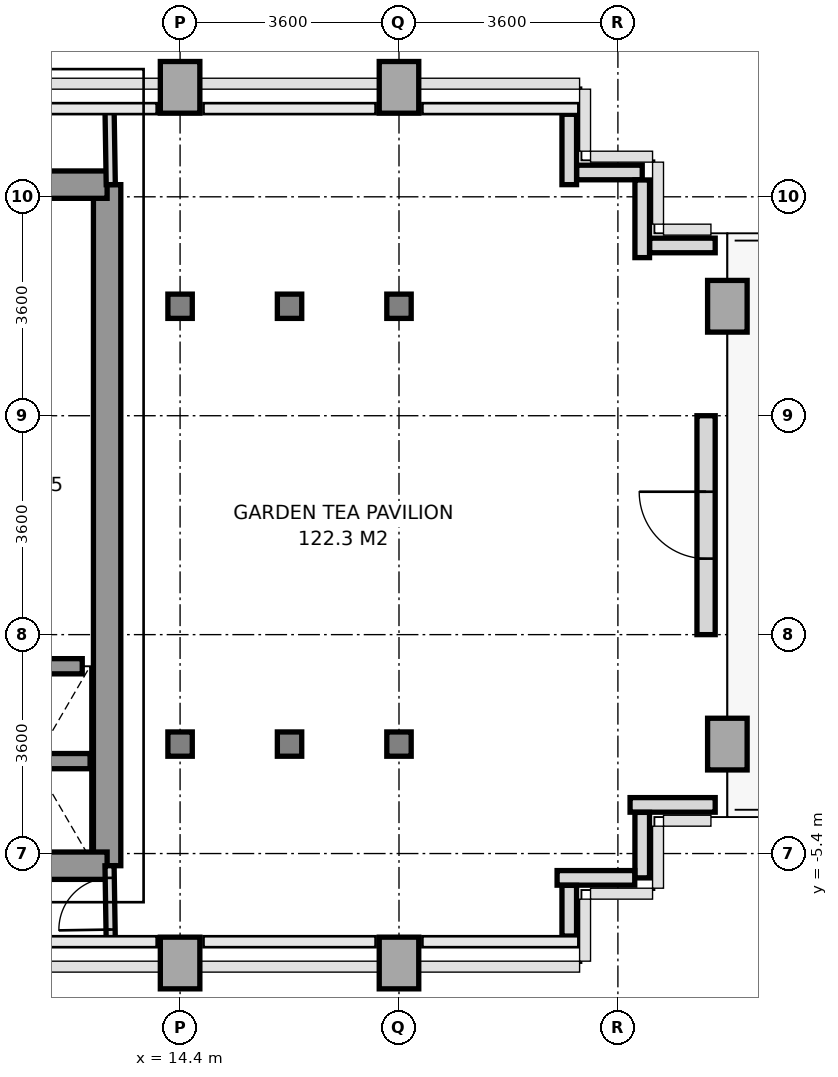
"""IFC4 building model, lengths in metres.
Left out: names, types, materials, properties, quantities, classifications, styles, units other than length and angle.
Written with IfcOpenShell. Run it as: python <this file> out.ifc"""

import sys

from ifc_helpers import new_model, si_unit, direction, frame, frame_2d, origin, origin_2d, place, context, subcontext, project, spatial, rectangle, i_section, extrude, source, transform, mapped, element, fill, save


model = new_model("IFC4")
c1 = context("Model", 3, precision=1e-05, world=origin(), true_north=direction((0.0, 1.0)))
c2 = subcontext(c1, "Body", "Model", "MODEL_VIEW")
j1 = project(units=[si_unit("LENGTHUNIT", "METRE"), si_unit("PLANEANGLEUNIT", "RADIAN")], contexts=[c1])
p1 = place(None, origin())
s1 = spatial("IfcSite", under=j1, at=p1, CompositionType="ELEMENT")
p2 = place(p1, origin())
s2 = spatial("IfcBuilding", under=s1, at=p2, CompositionType="ELEMENT")
p3 = place(p2, frame((0.0, 0.0, 93.0)))
s3 = spatial("IfcBuildingStorey", under=s2, at=p3, CompositionType="ELEMENT", Elevation=93.0)
m1 = source(origin(), c2, "Body", "SweptSolid", [
    extrude(rectangle(XDim=0.65, YDim=0.85, at=origin_2d()), origin(), (0.0, 0.0, 1.0), 4.0),
])
p4 = place(p3, frame((14.4, -7.2, 0.0), z_axis=(0.0, 0.0, 1.0), x_axis=(1.0, 0.0, 0.0)))
e1 = element("IfcColumn", 1, at=p4, inside=s3, PredefinedType="COLUMN", context=c2, shape_type="MappedRepresentation", body=[
    mapped(m1, transform((0.0, 0.0, 0.0), x_axis=(1.0, 0.0, 0.0), y_axis=(0.0, 1.0, 0.0), z_axis=(0.0, 0.0, 1.0), scale=1.0)),
])
m2 = source(origin(), c2, "Body", "SweptSolid", [
    extrude(i_section(OverallWidth=0.401, OverallDepth=0.399, WebThickness=0.02, FlangeThickness=0.032, at=origin_2d()), origin(), (0.0, 0.0, 1.0), 4.0),
])
for number, where, z_axis, x_axis in (
    (2, (14.4, -3.6, 0.0), (0.0, 0.0, 1.0), (1.0, 0.0, 0.0)),
    (3, (14.4, 3.6, 0.0), (0.0, 0.0, 1.0), (1.0, 0.0, 0.0)),
):
    element("IfcColumn", number, at=place(p3, frame(where, z_axis=z_axis, x_axis=x_axis)), inside=s3, PredefinedType="COLUMN", context=c2, shape_type="MappedRepresentation", body=[
        mapped(m2, transform((0.0, 0.0, 0.0), x_axis=(1.0, 0.0, 0.0), y_axis=(0.0, 1.0, 0.0), z_axis=(0.0, 0.0, 1.0), scale=1.0)),
    ])
p5 = place(p3, frame((14.4, 7.2, 0.0), z_axis=(0.0, 0.0, 1.0), x_axis=(1.0, 0.0, 0.0)))
e4 = element("IfcColumn", 4, at=p5, inside=s3, PredefinedType="COLUMN", context=c2, shape_type="MappedRepresentation", body=[
    mapped(m1, transform((0.0, 0.0, 0.0), x_axis=(1.0, 0.0, 0.0), y_axis=(0.0, 1.0, 0.0), z_axis=(0.0, 0.0, 1.0), scale=1.0)),
])
for number, where, z_axis, x_axis in (
    (5, (16.2, -3.6, 0.0), (0.0, 0.0, 1.0), (1.0, 0.0, 0.0)),
    (6, (16.2, 3.6, 0.0), (0.0, 0.0, 1.0), (1.0, 0.0, 0.0)),
):
    element("IfcColumn", number, at=place(p3, frame(where, z_axis=z_axis, x_axis=x_axis)), inside=s3, PredefinedType="COLUMN", context=c2, shape_type="MappedRepresentation", body=[
        mapped(m2, transform((0.0, 0.0, 0.0), x_axis=(1.0, 0.0, 0.0), y_axis=(0.0, 1.0, 0.0), z_axis=(0.0, 0.0, 1.0), scale=1.0)),
    ])
p6 = place(p3, frame((18.0, -7.2, 0.0), z_axis=(0.0, 0.0, 1.0), x_axis=(1.0, 0.0, 0.0)))
e7 = element("IfcColumn", 7, at=p6, inside=s3, PredefinedType="COLUMN", context=c2, shape_type="MappedRepresentation", body=[
    mapped(m1, transform((0.0, 0.0, 0.0), x_axis=(1.0, 0.0, 0.0), y_axis=(0.0, 1.0, 0.0), z_axis=(0.0, 0.0, 1.0), scale=1.0)),
])
for number, where, z_axis, x_axis in (
    (8, (18.0, -3.6, 0.0), (0.0, 0.0, 1.0), (1.0, 0.0, 0.0)),
    (9, (18.0, 3.6, 0.0), (0.0, 0.0, 1.0), (1.0, 0.0, 0.0)),
):
    element("IfcColumn", number, at=place(p3, frame(where, z_axis=z_axis, x_axis=x_axis)), inside=s3, PredefinedType="COLUMN", context=c2, shape_type="MappedRepresentation", body=[
        mapped(m2, transform((0.0, 0.0, 0.0), x_axis=(1.0, 0.0, 0.0), y_axis=(0.0, 1.0, 0.0), z_axis=(0.0, 0.0, 1.0), scale=1.0)),
    ])
for number, where, z_axis, x_axis in (
    (10, (18.0, 7.2, 0.0), (0.0, 0.0, 1.0), (1.0, 0.0, 0.0)),
    (11, (23.4, -3.6, 0.0), (0.0, 0.0, 1.0), (1.0, 0.0, 0.0)),
    (12, (23.4, 3.6, 0.0), (0.0, 0.0, 1.0), (1.0, 0.0, 0.0)),
):
    element("IfcColumn", number, at=place(p3, frame(where, z_axis=z_axis, x_axis=x_axis)), inside=s3, PredefinedType="COLUMN", context=c2, shape_type="MappedRepresentation", body=[
        mapped(m1, transform((0.0, 0.0, 0.0), x_axis=(1.0, 0.0, 0.0), y_axis=(0.0, 1.0, 0.0), z_axis=(0.0, 0.0, 1.0), scale=1.0)),
    ])
p7 = place(p3, frame((23.05, -1.8, 0.0), z_axis=(0.0, 0.0, 1.0), x_axis=(0.0, 1.0, 0.0)))
e13 = element("IfcWall", 13, at=p7, inside=s3, PredefinedType="SOLIDWALL", context=c2, shape_type="SweptSolid", body=[
    extrude(rectangle(XDim=3.6, YDim=0.3, at=frame_2d((1.8, 0.0))), origin(), (0.0, 0.0, 1.0), 3.25),
])
p8 = place(p7, frame((1.25, 0.0, 0.0)))
e14 = element("IfcOpeningElement", 14, at=p8, cuts=e13, PredefinedType="OPENING", context=c2, shape_type="SweptSolid", body=[
    extrude(rectangle(XDim=1.1, YDim=2.3, at=frame_2d((0.55, 1.15))), frame((0.0, 0.16, 0.0), z_axis=(0.0, -1.0, 0.0), x_axis=(1.0, 0.0, 0.0)), (0.0, 0.0, 1.0), 0.32),
])
p9 = place(p3, frame((23.2, -4.6, 0.0), z_axis=(0.0, 0.0, 1.0), x_axis=(-1.0, 0.0, 0.0)))
e15 = element("IfcWall", 15, at=p9, inside=s3, PredefinedType="PARAPET", context=c2, shape_type="SweptSolid", body=[
    extrude(rectangle(XDim=1.4, YDim=0.24, at=frame_2d((0.7, 0.0))), origin(), (0.0, 0.0, 1.0), 1.15),
])
p10 = place(p3, frame((22.0, -4.723, 0.0), z_axis=(0.0, 0.0, 1.0), x_axis=(0.0, -1.0, 0.0)))
e16 = element("IfcWall", 16, at=p10, inside=s3, PredefinedType="PARAPET", context=c2, shape_type="SweptSolid", body=[
    extrude(rectangle(XDim=1.077, YDim=0.24, at=frame_2d((0.539, 0.0))), origin(), (0.0, 0.0, 1.0), 1.15),
])
p11 = place(p3, frame((21.877, -5.8, 0.0), z_axis=(0.0, 0.0, 1.0), x_axis=(-1.0, 0.0, 0.0)))
e17 = element("IfcWall", 17, at=p11, inside=s3, PredefinedType="PARAPET", context=c2, shape_type="SweptSolid", body=[
    extrude(rectangle(XDim=1.277, YDim=0.24, at=frame_2d((0.638, 0.0))), origin(), (0.0, 0.0, 1.0), 1.15),
])
p12 = place(p3, frame((20.8, -5.923, 0.0), z_axis=(0.0, 0.0, 1.0), x_axis=(0.0, -1.0, 0.0)))
e18 = element("IfcWall", 18, at=p12, inside=s3, PredefinedType="PARAPET", context=c2, shape_type="SweptSolid", body=[
    extrude(rectangle(XDim=0.834, YDim=0.24, at=frame_2d((0.417, 0.0))), origin(), (0.0, 0.0, 1.0), 1.15),
])
p13 = place(p3, frame((20.8, 6.757, 0.0), z_axis=(0.0, 0.0, 1.0), x_axis=(0.0, -1.0, 0.0)))
e19 = element("IfcWall", 19, at=p13, inside=s3, PredefinedType="PARAPET", context=c2, shape_type="SweptSolid", body=[
    extrude(rectangle(XDim=1.157, YDim=0.24, at=frame_2d((0.579, 0.0))), origin(), (0.0, 0.0, 1.0), 1.15),
])
p14 = place(p3, frame((20.923, 5.8, 0.0), z_axis=(0.0, 0.0, 1.0), x_axis=(1.0, 0.0, 0.0)))
e20 = element("IfcWall", 20, at=p14, inside=s3, PredefinedType="PARAPET", context=c2, shape_type="SweptSolid", body=[
    extrude(rectangle(XDim=1.077, YDim=0.24, at=frame_2d((0.539, 0.0))), origin(), (0.0, 0.0, 1.0), 1.15),
])
p15 = place(p3, frame((22.0, 5.677, 0.0), z_axis=(0.0, 0.0, 1.0), x_axis=(0.0, -1.0, 0.0)))
e21 = element("IfcWall", 21, at=p15, inside=s3, PredefinedType="PARAPET", context=c2, shape_type="SweptSolid", body=[
    extrude(rectangle(XDim=1.277, YDim=0.24, at=frame_2d((0.639, 0.0))), origin(), (0.0, 0.0, 1.0), 1.15),
])
p16 = place(p3, frame((22.123, 4.6, 0.0), z_axis=(0.0, 0.0, 1.0), x_axis=(1.0, 0.0, 0.0)))
e22 = element("IfcWall", 22, at=p16, inside=s3, PredefinedType="PARAPET", context=c2, shape_type="SweptSolid", body=[
    extrude(rectangle(XDim=1.077, YDim=0.24, at=frame_2d((0.539, 0.0))), origin(), (0.0, 0.0, 1.0), 1.15),
])
p17 = place(p3, frame((13.2, -5.6, 0.0), z_axis=(0.0, 0.0, 1.0), x_axis=(0.0, 1.0, 0.0)))
e23 = element("IfcWall", 23, at=p17, inside=s3, PredefinedType="SHEAR", context=c2, shape_type="SweptSolid", body=[
    extrude(rectangle(XDim=11.2, YDim=0.45, at=frame_2d((5.6, 0.0))), origin(), (0.0, 0.0, 1.0), 4.0),
])
p18 = place(p3, frame((11.381, 5.6, 0.0), z_axis=(0.0, 0.0, 1.0), x_axis=(1.0, 0.0, 0.0)))
e24 = element("IfcWall", 24, at=p18, inside=s3, PredefinedType="SHEAR", context=c2, shape_type="SweptSolid", body=[
    extrude(rectangle(XDim=1.819, YDim=0.45, at=frame_2d((0.909, 0.0))), origin(), (0.0, 0.0, 1.0), 4.0),
])
p19 = place(p3, frame((5.4, -5.6, 0.0), z_axis=(0.0, 0.0, 1.0), x_axis=(1.0, 0.0, 0.0)))
e25 = element("IfcWall", 25, at=p19, inside=s3, PredefinedType="SHEAR", context=c2, shape_type="SweptSolid", body=[
    extrude(rectangle(XDim=7.8, YDim=0.45, at=frame_2d((3.9, 0.0))), origin(), (0.0, 0.0, 1.0), 4.0),
])
p20 = place(p19, frame((3.0, 0.0, 0.0)))
e26 = element("IfcOpeningElement", 26, at=p20, cuts=e25, PredefinedType="OPENING", context=c2, shape_type="SweptSolid", body=[
    extrude(rectangle(XDim=1.2, YDim=2.2, at=frame_2d((0.6, 1.1))), frame((0.0, 0.235, 0.0), z_axis=(0.0, -1.0, 0.0), x_axis=(1.0, 0.0, 0.0)), (0.0, 0.0, 1.0), 0.47),
])
p21 = place(p3, frame((11.08, -3.88, 0.0), z_axis=(0.0, 0.0, 1.0), x_axis=(1.0, 0.0, 0.0)))
e27 = element("IfcWall", 27, at=p21, inside=s3, PredefinedType="SOLIDWALL", context=c2, shape_type="SweptSolid", body=[
    extrude(rectangle(XDim=1.84, YDim=0.25, at=frame_2d((0.92, 0.0))), origin(), (0.0, 0.0, 1.0), 4.0),
])
p22 = place(p3, frame((11.209, -2.32, 0.0), z_axis=(0.0, 0.0, 1.0), x_axis=(1.0, 0.0, 0.0)))
e28 = element("IfcWall", 28, at=p22, inside=s3, PredefinedType="SOLIDWALL", context=c2, shape_type="SweptSolid", body=[
    extrude(rectangle(XDim=1.582, YDim=0.25, at=frame_2d((0.791, 0.0))), origin(), (0.0, 0.0, 1.0), 4.0),
])
p23 = place(p3, frame((13.26, 5.6, 0.0), z_axis=(0.0, 0.0, 1.0), x_axis=(-0.016013571389, 0.999871774545, 0.0)))
e29 = element("IfcWall", 29, at=p23, inside=s3, PredefinedType="PARTITIONING", context=c2, shape_type="SweptSolid", body=[
    extrude(rectangle(XDim=1.25, YDim=0.15, at=frame_2d((0.625, 0.0))), origin(), (0.0, 0.0, 1.0), 4.0),
])
p24 = place(p3, frame((13.26, -6.85, 0.0), z_axis=(0.0, 0.0, 1.0), x_axis=(-0.016013571389, 0.999871774545, 0.0)))
e30 = element("IfcWall", 30, at=p24, inside=s3, PredefinedType="PARTITIONING", context=c2, shape_type="SweptSolid", body=[
    extrude(rectangle(XDim=1.25, YDim=0.15, at=frame_2d((0.625, 0.0))), origin(), (0.0, 0.0, 1.0), 4.0),
])
p25 = place(p24, frame((0.2, 0.0, 0.0)))
e31 = element("IfcOpeningElement", 31, at=p25, cuts=e30, PredefinedType="OPENING", context=c2, shape_type="SweptSolid", body=[
    extrude(rectangle(XDim=0.85, YDim=2.1, at=frame_2d((0.425, 1.05))), frame((0.0, 0.085, 0.0), z_axis=(0.0, -1.0, 0.0), x_axis=(1.0, 0.0, 0.0)), (0.0, 0.0, 1.0), 0.17),
])
m3 = source(origin(), c2, "Body", "SweptSolid", [
    extrude(rectangle(XDim=1.1, YDim=2.3, at=frame_2d((0.55, 1.15))), frame((0.0, 0.025, 0.0), z_axis=(0.0, -1.0, 0.0), x_axis=(1.0, 0.0, 0.0)), (0.0, 0.0, 1.0), 0.05),
])
p26 = place(p8, frame((1.1, 0.0, 0.0), z_axis=(0.0, 0.0, 1.0), x_axis=(-1.0, 0.0, 0.0)))
e32 = element("IfcDoor", 32, at=p26, inside=s3, OperationType="SINGLE_SWING_RIGHT", PredefinedType="DOOR", context=c2, shape_type="MappedRepresentation", body=[
    mapped(m3, transform((0.0, 0.0, 0.0), x_axis=(1.0, 0.0, 0.0), y_axis=(0.0, 1.0, 0.0), z_axis=(0.0, 0.0, 1.0), scale=1.0)),
])
fill(e14, e32)
m4 = source(origin(), c2, "Body", "SweptSolid", [
    extrude(rectangle(XDim=0.85, YDim=2.1, at=frame_2d((0.425, 1.05))), frame((0.0, 0.025, 0.0), z_axis=(0.0, -1.0, 0.0), x_axis=(1.0, 0.0, 0.0)), (0.0, 0.0, 1.0), 0.05),
])
p27 = place(p25, origin())
e33 = element("IfcDoor", 33, at=p27, inside=s3, OperationType="SINGLE_SWING_LEFT", PredefinedType="DOOR", context=c2, shape_type="MappedRepresentation", body=[
    mapped(m4, transform((0.0, 0.0, 0.0), x_axis=(1.0, 0.0, 0.0), y_axis=(0.0, 1.0, 0.0), z_axis=(0.0, 0.0, 1.0), scale=1.0)),
])
fill(e31, e33)
save(model, sys.argv[1])
